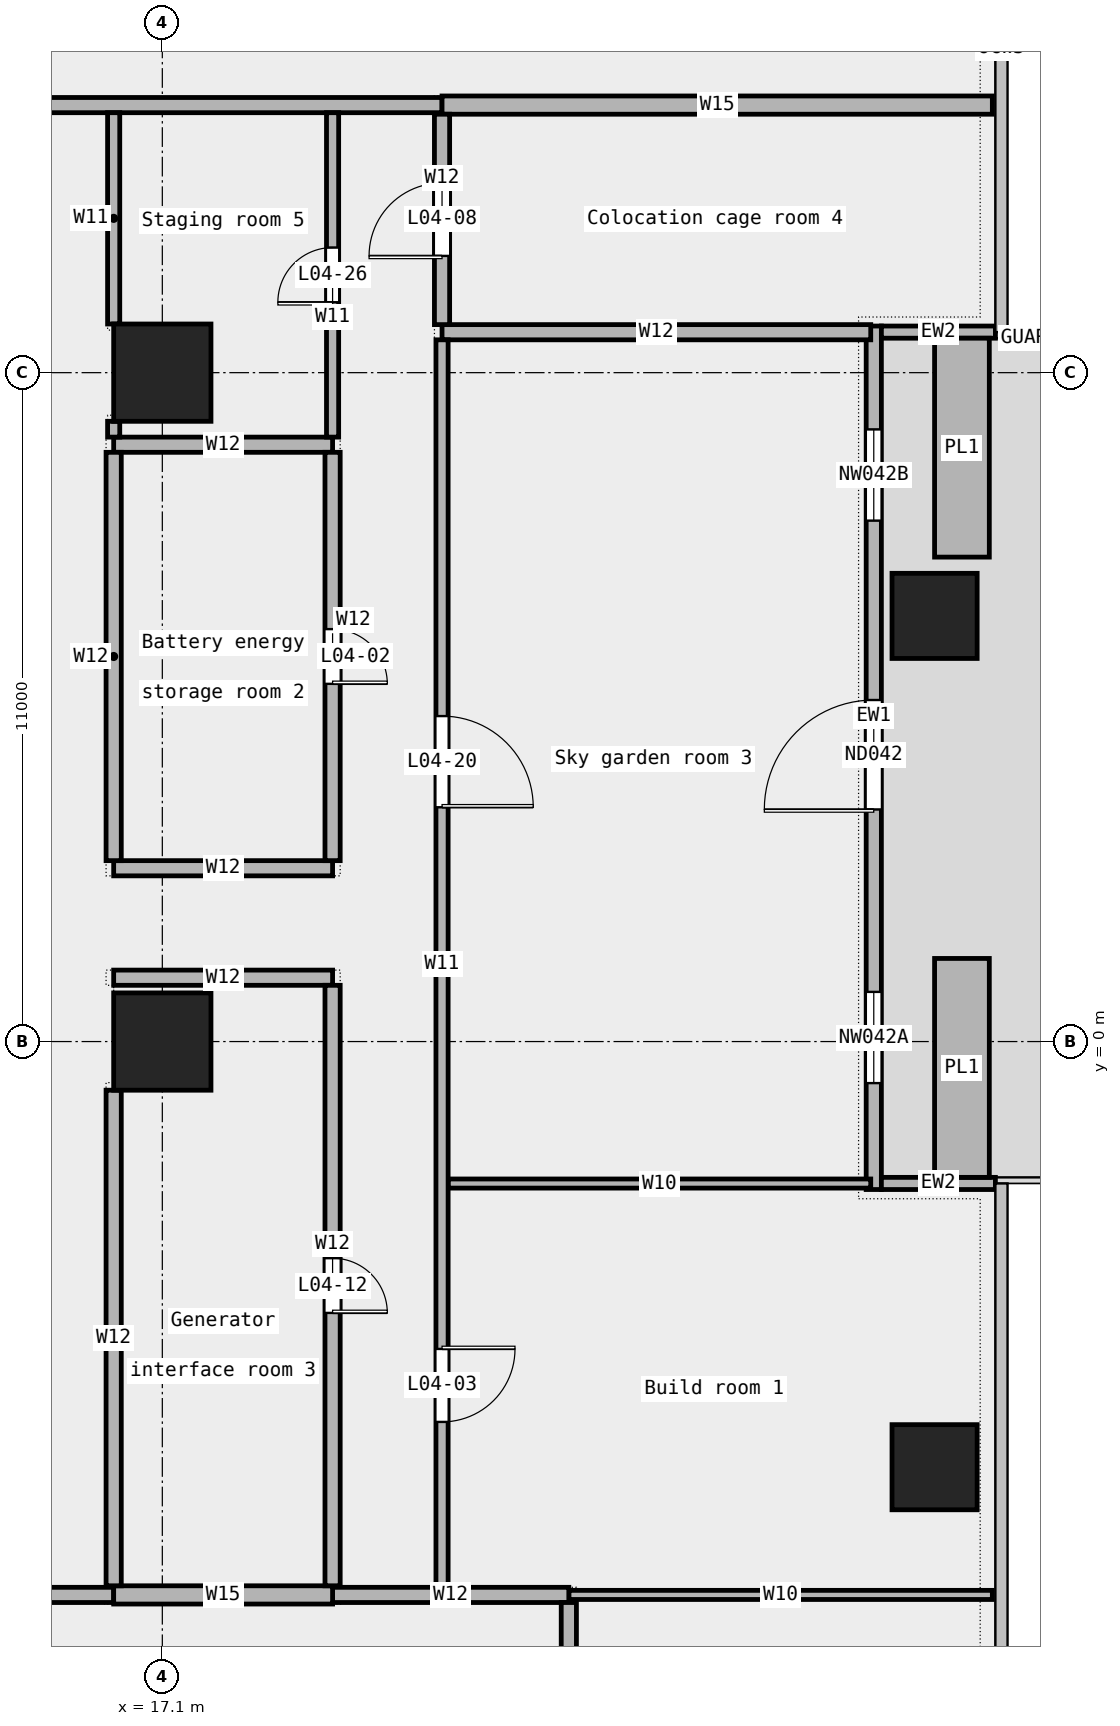
"""IFC4 building model, lengths in metres.
Left out: names, types, materials, properties, quantities, classifications, styles, units other than length and angle.
Written with IfcOpenShell. Run it as: python <this file> out.ifc"""

import sys

from ifc_helpers import new_model, si_unit, direction, frame, frame_2d, origin, origin_2d, place, context, subcontext, project, spatial, rectangle, extrude, element, fill, save


model = new_model("IFC4")
c1 = context("Model", 3, precision=1e-05, world=origin(), true_north=direction((0.0, 1.0)))
c2 = subcontext(c1, "Body", "Model", "MODEL_VIEW")
j1 = project(units=[si_unit("LENGTHUNIT", "METRE"), si_unit("PLANEANGLEUNIT", "RADIAN")], contexts=[c1])
p1 = place(None, origin())
s1 = spatial("IfcSite", under=j1, at=p1, CompositionType="ELEMENT")
p2 = place(p1, origin())
s2 = spatial("IfcBuilding", under=s1, at=p2, CompositionType="ELEMENT")
p3 = place(p2, frame((0.0, 0.0, 25.5)))
s3 = spatial("IfcBuildingStorey", under=s2, at=p3, CompositionType="ELEMENT", Elevation=25.5)
for number, where, z_axis, x_axis in (
    (1, (29.8, -7.0, 0.0), (0.0, 0.0, 1.0), (1.0, 0.0, 0.0)),
    (2, (29.8, 7.0, 0.0), (0.0, 0.0, 1.0), (1.0, 0.0, 0.0)),
):
    element("IfcColumn", number, at=place(p3, frame(where, z_axis=z_axis, x_axis=x_axis)), inside=s3, PredefinedType="COLUMN", context=c2, shape_type="SweptSolid", body=[
        extrude(rectangle(XDim=1.4, YDim=1.4, at=origin_2d()), origin(), (0.0, 0.0, 1.0), 5.05),
    ])
for number, where, z_axis, x_axis in (
    (3, (17.1, 0.0, 0.0), (0.0, 0.0, 1.0), (1.0, 0.0, 0.0)),
    (4, (17.1, 11.0, 0.0), (0.0, 0.0, 1.0), (1.0, 0.0, 0.0)),
):
    element("IfcColumn", number, at=place(p3, frame(where, z_axis=z_axis, x_axis=x_axis)), inside=s3, PredefinedType="COLUMN", context=c2, shape_type="SweptSolid", body=[
        extrude(rectangle(XDim=1.6, YDim=1.6, at=origin_2d()), origin(), (0.0, 0.0, 1.0), 5.05),
    ])
p4 = place(p3, frame((28.8, -2.433, 0.0), z_axis=(0.0, 0.0, 1.0), x_axis=(0.0, 1.0, 0.0)))
e5 = element("IfcWall", 5, at=p4, inside=s3, PredefinedType="STANDARD", context=c2, shape_type="SweptSolid", body=[
    extrude(rectangle(XDim=14.2, YDim=0.25, at=frame_2d((7.1, 0.0))), origin(), (0.0, 0.0, 1.0), 5.05),
])
p5 = place(p4, frame((1.75, 0.0, 0.45)))
e6 = element("IfcOpeningElement", 6, at=p5, cuts=e5, PredefinedType="OPENING", context=c2, shape_type="SweptSolid", body=[
    extrude(rectangle(XDim=1.5, YDim=3.0, at=frame_2d((0.75, 1.5))), frame((0.0, 0.137, 0.0), z_axis=(0.0, -1.0, 0.0), x_axis=(1.0, 0.0, 0.0)), (0.0, 0.0, 1.0), 0.274),
])
p6 = place(p4, frame((6.25, 0.0, 0.0)))
e7 = element("IfcOpeningElement", 7, at=p6, cuts=e5, PredefinedType="OPENING", context=c2, shape_type="SweptSolid", body=[
    extrude(rectangle(XDim=1.8, YDim=2.4, at=frame_2d((0.9, 1.2))), frame((0.0, 0.137, 0.0), z_axis=(0.0, -1.0, 0.0), x_axis=(1.0, 0.0, 0.0)), (0.0, 0.0, 1.0), 0.274),
])
p7 = place(p4, frame((11.0, 0.0, 0.45)))
e8 = element("IfcOpeningElement", 8, at=p7, cuts=e5, PredefinedType="OPENING", context=c2, shape_type="SweptSolid", body=[
    extrude(rectangle(XDim=1.5, YDim=3.0, at=frame_2d((0.75, 1.5))), frame((0.0, 0.137, 0.0), z_axis=(0.0, -1.0, 0.0), x_axis=(1.0, 0.0, 0.0)), (0.0, 0.0, 1.0), 0.274),
])
for number, where, z_axis, x_axis in (
    (9, (30.8, -2.333, 0.0), (0.0, 0.0, 1.0), (-1.0, 0.0, 0.0)),
    (10, (30.8, 11.667, 0.0), (0.0, 0.0, 1.0), (-1.0, 0.0, 0.0)),
):
    element("IfcWall", number, at=place(p3, frame(where, z_axis=z_axis, x_axis=x_axis)), inside=s3, PredefinedType="STANDARD", context=c2, shape_type="SweptSolid", body=[
        extrude(rectangle(XDim=1.875, YDim=0.2, at=frame_2d((0.938, 0.0))), origin(), (0.0, 0.0, 1.0), 5.05),
    ])
for number, where, z_axis, x_axis in (
    (11, (30.25, -2.233, 0.0), (0.0, 0.0, 1.0), (0.0, 1.0, 0.0)),
    (12, (30.25, 7.967, 0.0), (0.0, 0.0, 1.0), (0.0, 1.0, 0.0)),
):
    element("IfcWall", number, at=place(p3, frame(where, z_axis=z_axis, x_axis=x_axis)), inside=s3, PredefinedType="STANDARD", context=c2, shape_type="SweptSolid", body=[
        extrude(rectangle(XDim=3.6, YDim=0.9, at=frame_2d((1.8, 0.0))), origin(), (0.0, 0.0, 1.0), 0.7),
    ])
p8 = place(p3, frame((23.785, -9.1, 0.0), z_axis=(0.0, 0.0, 1.0), x_axis=(1.0, 0.0, 0.0)))
e13 = element("IfcWall", 13, at=p8, inside=s3, PredefinedType="PARTITIONING", context=c2, shape_type="SweptSolid", body=[
    extrude(rectangle(XDim=6.965, YDim=0.15, at=frame_2d((3.482, 0.0))), origin(), (0.0, 0.0, 1.0), 5.05),
])
p9 = place(p3, frame((12.51, -9.1, 0.0), z_axis=(0.0, 0.0, 1.0), x_axis=(1.0, 0.0, 0.0)))
e14 = element("IfcWall", 14, at=p9, inside=s3, PredefinedType="PARTITIONING", context=c2, shape_type="SweptSolid", body=[
    extrude(rectangle(XDim=3.79, YDim=0.25, at=frame_2d((1.895, 0.0))), origin(), (0.0, 0.0, 1.0), 5.05),
])
p10 = place(p3, frame((19.9, -9.1, 0.0), z_axis=(0.0, 0.0, 1.0), x_axis=(1.0, 0.0, 0.0)))
e15 = element("IfcWall", 15, at=p10, inside=s3, PredefinedType="PARTITIONING", context=c2, shape_type="SweptSolid", body=[
    extrude(rectangle(XDim=3.885, YDim=0.25, at=frame_2d((1.942, 0.0))), origin(), (0.0, 0.0, 1.0), 5.05),
])
p11 = place(p3, frame((16.3, -9.1, 0.0), z_axis=(0.0, 0.0, 1.0), x_axis=(1.0, 0.0, 0.0)))
e16 = element("IfcWall", 16, at=p11, inside=s3, PredefinedType="PARTITIONING", context=c2, shape_type="SweptSolid", body=[
    extrude(rectangle(XDim=3.6, YDim=0.3, at=frame_2d((1.8, 0.0))), origin(), (0.0, 0.0, 1.0), 5.05),
])
p12 = place(p3, frame((21.8, -2.335, 0.0), z_axis=(0.0, 0.0, 1.0), x_axis=(1.0, 0.0, 0.0)))
e17 = element("IfcWall", 17, at=p12, inside=s3, PredefinedType="PARTITIONING", context=c2, shape_type="SweptSolid", body=[
    extrude(rectangle(XDim=6.95, YDim=0.15, at=frame_2d((3.475, 0.0))), origin(), (0.0, 0.0, 1.0), 5.05),
])
for number, where, z_axis, x_axis in (
    (18, (16.3, 1.05, 0.0), (0.0, 0.0, 1.0), (1.0, 0.0, 0.0)),
    (19, (16.3, 2.85, 0.0), (0.0, 0.0, 1.0), (1.0, 0.0, 0.0)),
    (20, (16.3, 9.815, 0.0), (0.0, 0.0, 1.0), (1.0, 0.0, 0.0)),
):
    element("IfcWall", number, at=place(p3, frame(where, z_axis=z_axis, x_axis=x_axis)), inside=s3, PredefinedType="PARTITIONING", context=c2, shape_type="SweptSolid", body=[
        extrude(rectangle(XDim=3.6, YDim=0.25, at=frame_2d((1.8, 0.0))), origin(), (0.0, 0.0, 1.0), 5.05),
    ])
p13 = place(p3, frame((21.7, 11.665, 0.0), z_axis=(0.0, 0.0, 1.0), x_axis=(1.0, 0.0, 0.0)))
e21 = element("IfcWall", 21, at=p13, inside=s3, PredefinedType="PARTITIONING", context=c2, shape_type="SweptSolid", body=[
    extrude(rectangle(XDim=7.05, YDim=0.25, at=frame_2d((3.525, 0.0))), origin(), (0.0, 0.0, 1.0), 5.05),
])
p14 = place(p3, frame((-1.33, 15.4, 0.0), z_axis=(0.0, 0.0, 1.0), x_axis=(1.0, 0.0, 0.0)))
e22 = element("IfcWall", 22, at=p14, inside=s3, PredefinedType="PARTITIONING", context=c2, shape_type="SweptSolid", body=[
    extrude(rectangle(XDim=23.03, YDim=0.25, at=frame_2d((11.515, 0.0))), origin(), (0.0, 0.0, 1.0), 5.05),
])
p15 = place(p14, frame((3.385, 0.0, 0.0)))
e23 = element("IfcOpeningElement", 23, at=p15, cuts=e22, PredefinedType="OPENING", context=c2, shape_type="SweptSolid", body=[
    extrude(rectangle(XDim=1.2, YDim=2.1, at=frame_2d((0.6, 1.05))), frame((0.0, 0.137, 0.0), z_axis=(0.0, -1.0, 0.0), x_axis=(1.0, 0.0, 0.0)), (0.0, 0.0, 1.0), 0.274),
])
p16 = place(p14, frame((11.9, 0.0, 0.0)))
e24 = element("IfcOpeningElement", 24, at=p16, cuts=e22, PredefinedType="OPENING", context=c2, shape_type="SweptSolid", body=[
    extrude(rectangle(XDim=1.8, YDim=2.1, at=frame_2d((0.9, 1.05))), frame((0.0, 0.137, 0.0), z_axis=(0.0, -1.0, 0.0), x_axis=(1.0, 0.0, 0.0)), (0.0, 0.0, 1.0), 0.274),
])
p17 = place(p3, frame((21.7, 15.4, 0.0), z_axis=(0.0, 0.0, 1.0), x_axis=(1.0, 0.0, 0.0)))
e25 = element("IfcWall", 25, at=p17, inside=s3, PredefinedType="PARTITIONING", context=c2, shape_type="SweptSolid", body=[
    extrude(rectangle(XDim=9.05, YDim=0.3, at=frame_2d((4.525, 0.0))), origin(), (0.0, 0.0, 1.0), 5.05),
])
p18 = place(p3, frame((16.3, 9.94, 0.0), z_axis=(0.0, 0.0, 1.0), x_axis=(0.0, 1.0, 0.0)))
e26 = element("IfcWall", 26, at=p18, inside=s3, PredefinedType="PARTITIONING", context=c2, shape_type="SweptSolid", body=[
    extrude(rectangle(XDim=0.26, YDim=0.2, at=frame_2d((0.13, 0.0))), origin(), (0.0, 0.0, 1.0), 5.05),
])
p19 = place(p3, frame((16.3, 11.8, 0.0), z_axis=(0.0, 0.0, 1.0), x_axis=(0.0, 1.0, 0.0)))
e27 = element("IfcWall", 27, at=p19, inside=s3, PredefinedType="PARTITIONING", context=c2, shape_type="SweptSolid", body=[
    extrude(rectangle(XDim=3.475, YDim=0.2, at=frame_2d((1.737, 0.0))), origin(), (0.0, 0.0, 1.0), 5.05),
])
p20 = place(p3, frame((16.3, -8.95, 0.0), z_axis=(0.0, 0.0, 1.0), x_axis=(0.0, 1.0, 0.0)))
e28 = element("IfcWall", 28, at=p20, inside=s3, PredefinedType="PARTITIONING", context=c2, shape_type="SweptSolid", body=[
    extrude(rectangle(XDim=8.15, YDim=0.25, at=frame_2d((4.075, 0.0))), origin(), (0.0, 0.0, 1.0), 5.05),
])
p21 = place(p3, frame((16.3, 2.975, 0.0), z_axis=(0.0, 0.0, 1.0), x_axis=(0.0, 1.0, 0.0)))
e29 = element("IfcWall", 29, at=p21, inside=s3, PredefinedType="PARTITIONING", context=c2, shape_type="SweptSolid", body=[
    extrude(rectangle(XDim=6.715, YDim=0.25, at=frame_2d((3.357, 0.0))), origin(), (0.0, 0.0, 1.0), 5.05),
])
p22 = place(p3, frame((19.9, 9.94, 0.0), z_axis=(0.0, 0.0, 1.0), x_axis=(0.0, 1.0, 0.0)))
e30 = element("IfcWall", 30, at=p22, inside=s3, PredefinedType="PARTITIONING", context=c2, shape_type="SweptSolid", body=[
    extrude(rectangle(XDim=5.335, YDim=0.2, at=frame_2d((2.667, 0.0))), origin(), (0.0, 0.0, 1.0), 5.05),
])
p23 = place(p22, frame((2.218, 0.0, 0.0)))
e31 = element("IfcOpeningElement", 31, at=p23, cuts=e30, PredefinedType="OPENING", context=c2, shape_type="SweptSolid", body=[
    extrude(rectangle(XDim=0.9, YDim=2.1, at=frame_2d((0.45, 1.05))), frame((0.0, 0.112, 0.0), z_axis=(0.0, -1.0, 0.0), x_axis=(1.0, 0.0, 0.0)), (0.0, 0.0, 1.0), 0.224),
])
p24 = place(p3, frame((19.9, -8.95, 0.0), z_axis=(0.0, 0.0, 1.0), x_axis=(0.0, 1.0, 0.0)))
e32 = element("IfcWall", 32, at=p24, inside=s3, PredefinedType="PARTITIONING", context=c2, shape_type="SweptSolid", body=[
    extrude(rectangle(XDim=9.875, YDim=0.25, at=frame_2d((4.938, 0.0))), origin(), (0.0, 0.0, 1.0), 5.05),
])
p25 = place(p24, frame((4.488, 0.0, 0.0)))
e33 = element("IfcOpeningElement", 33, at=p25, cuts=e32, PredefinedType="OPENING", context=c2, shape_type="SweptSolid", body=[
    extrude(rectangle(XDim=0.9, YDim=2.1, at=frame_2d((0.45, 1.05))), frame((0.0, 0.137, 0.0), z_axis=(0.0, -1.0, 0.0), x_axis=(1.0, 0.0, 0.0)), (0.0, 0.0, 1.0), 0.274),
])
p26 = place(p3, frame((19.9, 2.975, 0.0), z_axis=(0.0, 0.0, 1.0), x_axis=(0.0, 1.0, 0.0)))
e34 = element("IfcWall", 34, at=p26, inside=s3, PredefinedType="PARTITIONING", context=c2, shape_type="SweptSolid", body=[
    extrude(rectangle(XDim=6.715, YDim=0.25, at=frame_2d((3.357, 0.0))), origin(), (0.0, 0.0, 1.0), 5.05),
])
p27 = place(p26, frame((2.907, 0.0, 0.0)))
e35 = element("IfcOpeningElement", 35, at=p27, cuts=e34, PredefinedType="OPENING", context=c2, shape_type="SweptSolid", body=[
    extrude(rectangle(XDim=0.9, YDim=2.1, at=frame_2d((0.45, 1.05))), frame((0.0, 0.137, 0.0), z_axis=(0.0, -1.0, 0.0), x_axis=(1.0, 0.0, 0.0)), (0.0, 0.0, 1.0), 0.274),
])
p28 = place(p3, frame((21.7, -8.975, 0.0), z_axis=(0.0, 0.0, 1.0), x_axis=(0.0, 1.0, 0.0)))
e36 = element("IfcWall", 36, at=p28, inside=s3, PredefinedType="PARTITIONING", context=c2, shape_type="SweptSolid", body=[
    extrude(rectangle(XDim=20.515, YDim=0.2, at=frame_2d((10.258, 0.0))), origin(), (0.0, 0.0, 1.0), 5.05),
])
p29 = place(p28, frame((2.72, 0.0, 0.0)))
e37 = element("IfcOpeningElement", 37, at=p29, cuts=e36, PredefinedType="OPENING", context=c2, shape_type="SweptSolid", body=[
    extrude(rectangle(XDim=1.2, YDim=2.1, at=frame_2d((0.6, 1.05))), frame((0.0, 0.112, 0.0), z_axis=(0.0, -1.0, 0.0), x_axis=(1.0, 0.0, 0.0)), (0.0, 0.0, 1.0), 0.224),
])
p30 = place(p28, frame((12.827, 0.0, 0.0)))
e38 = element("IfcOpeningElement", 38, at=p30, cuts=e36, PredefinedType="OPENING", context=c2, shape_type="SweptSolid", body=[
    extrude(rectangle(XDim=1.5, YDim=2.1, at=frame_2d((0.75, 1.05))), frame((0.0, 0.112, 0.0), z_axis=(0.0, -1.0, 0.0), x_axis=(1.0, 0.0, 0.0)), (0.0, 0.0, 1.0), 0.224),
])
p31 = place(p3, frame((21.7, 11.79, 0.0), z_axis=(0.0, 0.0, 1.0), x_axis=(0.0, 1.0, 0.0)))
e39 = element("IfcWall", 39, at=p31, inside=s3, PredefinedType="PARTITIONING", context=c2, shape_type="SweptSolid", body=[
    extrude(rectangle(XDim=3.46, YDim=0.25, at=frame_2d((1.73, 0.0))), origin(), (0.0, 0.0, 1.0), 5.05),
])
p32 = place(p31, frame((1.13, 0.0, 0.0)))
e40 = element("IfcOpeningElement", 40, at=p32, cuts=e39, PredefinedType="OPENING", context=c2, shape_type="SweptSolid", body=[
    extrude(rectangle(XDim=1.2, YDim=2.1, at=frame_2d((0.6, 1.05))), frame((0.0, 0.137, 0.0), z_axis=(0.0, -1.0, 0.0), x_axis=(1.0, 0.0, 0.0)), (0.0, 0.0, 1.0), 0.274),
])
p33 = place(p3, frame((23.785, -15.825, 0.0), z_axis=(0.0, 0.0, 1.0), x_axis=(0.0, 1.0, 0.0)))
e41 = element("IfcWall", 41, at=p33, inside=s3, PredefinedType="PARTITIONING", context=c2, shape_type="SweptSolid", body=[
    extrude(rectangle(XDim=6.6, YDim=0.25, at=frame_2d((3.3, 0.0))), origin(), (0.0, 0.0, 1.0), 5.05),
])
p34 = place(p5, origin())
e42 = element("IfcWindow", 42, at=p34, inside=s3, PartitioningType="SINGLE_PANEL", PredefinedType="WINDOW", context=c2, shape_type="SweptSolid", body=[
    extrude(rectangle(XDim=1.5, YDim=3.0, at=frame_2d((0.75, 1.5))), frame((0.0, 0.03, 0.0), z_axis=(0.0, -1.0, 0.0), x_axis=(1.0, 0.0, 0.0)), (0.0, 0.0, 1.0), 0.06),
])
fill(e6, e42)
p35 = place(p6, origin())
e43 = element("IfcDoor", 43, at=p35, inside=s3, OperationType="DOUBLE_DOOR_SINGLE_SWING", PredefinedType="DOOR", context=c2, shape_type="SweptSolid", body=[
    extrude(rectangle(XDim=1.8, YDim=2.4, at=frame_2d((0.9, 1.2))), frame((0.0, 0.025, 0.0), z_axis=(0.0, -1.0, 0.0), x_axis=(1.0, 0.0, 0.0)), (0.0, 0.0, 1.0), 0.05),
])
fill(e7, e43)
p36 = place(p7, origin())
e44 = element("IfcWindow", 44, at=p36, inside=s3, PartitioningType="SINGLE_PANEL", PredefinedType="WINDOW", context=c2, shape_type="SweptSolid", body=[
    extrude(rectangle(XDim=1.5, YDim=3.0, at=frame_2d((0.75, 1.5))), frame((0.0, 0.03, 0.0), z_axis=(0.0, -1.0, 0.0), x_axis=(1.0, 0.0, 0.0)), (0.0, 0.0, 1.0), 0.06),
])
fill(e8, e44)
p37 = place(p27, origin())
e45 = element("IfcDoor", 45, at=p37, inside=s3, OperationType="SINGLE_SWING_RIGHT", PredefinedType="DOOR", context=c2, shape_type="SweptSolid", body=[
    extrude(rectangle(XDim=0.9, YDim=2.1, at=frame_2d((0.45, 1.05))), frame((0.0, 0.025, 0.0), z_axis=(0.0, -1.0, 0.0), x_axis=(1.0, 0.0, 0.0)), (0.0, 0.0, 1.0), 0.05),
])
fill(e35, e45)
p38 = place(p29, origin())
e46 = element("IfcDoor", 46, at=p38, inside=s3, OperationType="SINGLE_SWING_LEFT", PredefinedType="DOOR", context=c2, shape_type="SweptSolid", body=[
    extrude(rectangle(XDim=1.2, YDim=2.1, at=frame_2d((0.6, 1.05))), frame((0.0, 0.025, 0.0), z_axis=(0.0, -1.0, 0.0), x_axis=(1.0, 0.0, 0.0)), (0.0, 0.0, 1.0), 0.05),
])
fill(e37, e46)
p39 = place(p32, origin())
e47 = element("IfcDoor", 47, at=p39, inside=s3, OperationType="SINGLE_SWING_LEFT", PredefinedType="DOOR", context=c2, shape_type="SweptSolid", body=[
    extrude(rectangle(XDim=1.2, YDim=2.1, at=frame_2d((0.6, 1.05))), frame((0.0, 0.025, 0.0), z_axis=(0.0, -1.0, 0.0), x_axis=(1.0, 0.0, 0.0)), (0.0, 0.0, 1.0), 0.05),
])
fill(e40, e47)
p40 = place(p25, origin())
e48 = element("IfcDoor", 48, at=p40, inside=s3, OperationType="SINGLE_SWING_RIGHT", PredefinedType="DOOR", context=c2, shape_type="SweptSolid", body=[
    extrude(rectangle(XDim=0.9, YDim=2.1, at=frame_2d((0.45, 1.05))), frame((0.0, 0.025, 0.0), z_axis=(0.0, -1.0, 0.0), x_axis=(1.0, 0.0, 0.0)), (0.0, 0.0, 1.0), 0.05),
])
fill(e33, e48)
p41 = place(p30, origin())
e49 = element("IfcDoor", 49, at=p41, inside=s3, OperationType="DOUBLE_DOOR_SINGLE_SWING", PredefinedType="DOOR", context=c2, shape_type="SweptSolid", body=[
    extrude(rectangle(XDim=1.5, YDim=2.1, at=frame_2d((0.75, 1.05))), frame((0.0, 0.025, 0.0), z_axis=(0.0, -1.0, 0.0), x_axis=(1.0, 0.0, 0.0)), (0.0, 0.0, 1.0), 0.05),
])
fill(e38, e49)
p42 = place(p23, origin())
e50 = element("IfcDoor", 50, at=p42, inside=s3, OperationType="SINGLE_SWING_LEFT", PredefinedType="DOOR", context=c2, shape_type="SweptSolid", body=[
    extrude(rectangle(XDim=0.9, YDim=2.1, at=frame_2d((0.45, 1.05))), frame((0.0, 0.025, 0.0), z_axis=(0.0, -1.0, 0.0), x_axis=(1.0, 0.0, 0.0)), (0.0, 0.0, 1.0), 0.05),
])
fill(e31, e50)
save(model, sys.argv[1])
